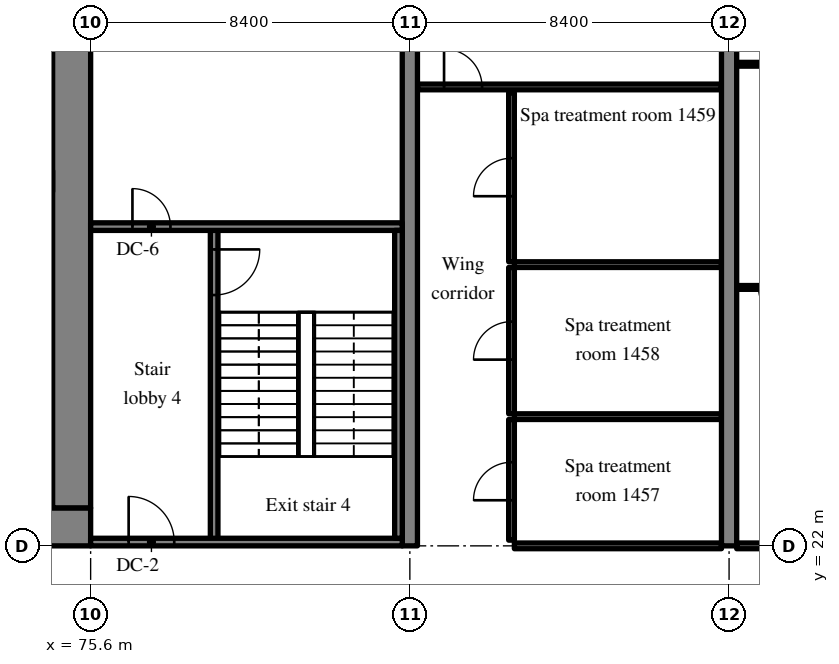
"""IFC4 building model, lengths in metres.
Left out: names, types, materials, properties, quantities, classifications, styles, units other than length and angle.
Written with IfcOpenShell. Run it as: python <this file> out.ifc"""

import sys

from ifc_helpers import new_model, si_unit, direction, frame, frame_2d, origin, place, context, subcontext, project, spatial, rectangle, extrude, source, transform, mapped, element, fill, save


model = new_model("IFC4")
c1 = context("Model", 3, precision=1e-05, world=origin(), true_north=direction((0.0, 1.0)))
c2 = subcontext(c1, "Body", "Model", "MODEL_VIEW")
j1 = project(units=[si_unit("LENGTHUNIT", "METRE"), si_unit("PLANEANGLEUNIT", "RADIAN")], contexts=[c1])
p1 = place(None, origin())
s1 = spatial("IfcSite", under=j1, at=p1, CompositionType="ELEMENT")
p2 = place(p1, origin())
s2 = spatial("IfcBuilding", under=s1, at=p2, CompositionType="ELEMENT")
p3 = place(p2, frame((0.0, 0.0, 62.0)))
s3 = spatial("IfcBuildingStorey", under=s2, at=p3, CompositionType="ELEMENT", Elevation=62.0)
m1 = source(origin(), c2, "Body", "SweptSolid", [
    extrude(rectangle(XDim=50.4, YDim=1.0, at=frame_2d((25.2, 0.0))), origin(), (0.0, 0.0, 1.0), 3.52),
])
p4 = place(p3, frame((25.2, 22.5, 0.0), z_axis=(0.0, 0.0, 1.0), x_axis=(1.0, 0.0, 0.0)))
e1 = element("IfcWall", 1, at=p4, inside=s3, PredefinedType="SHEAR", context=c2, shape_type="MappedRepresentation", body=[
    mapped(m1, transform((0.0, 0.0, 0.0), scale=1.0)),
])
m2 = source(origin(), c2, "Body", "SweptSolid", [
    extrude(rectangle(XDim=1.8, YDim=2.1, at=frame_2d((0.9, 1.05))), frame((0.0, 0.51, 0.0), z_axis=(0.0, -1.0, 0.0), x_axis=(1.0, 0.0, 0.0)), (0.0, 0.0, 1.0), 1.02),
])
p5 = place(p4, frame((15.9, 0.0, 0.0)))
e2 = element("IfcOpeningElement", 2, at=p5, cuts=e1, PredefinedType="OPENING", context=c2, shape_type="MappedRepresentation", body=[
    mapped(m2, transform((0.0, 0.0, 0.0), scale=1.0)),
])
m3 = source(origin(), c2, "Body", "SweptSolid", [
    extrude(rectangle(XDim=1.2, YDim=2.1, at=frame_2d((0.6, 1.05))), frame((0.0, 0.51, 0.0), z_axis=(0.0, -1.0, 0.0), x_axis=(1.0, 0.0, 0.0)), (0.0, 0.0, 1.0), 1.02),
])
p6 = place(p4, frame((26.987, 0.0, 0.0)))
e3 = element("IfcOpeningElement", 3, at=p6, cuts=e1, PredefinedType="OPENING", context=c2, shape_type="MappedRepresentation", body=[
    mapped(m3, transform((0.0, 0.0, 0.0), scale=1.0)),
])
m4 = source(origin(), c2, "Body", "SweptSolid", [
    extrude(rectangle(XDim=0.9, YDim=2.1, at=frame_2d((0.45, 1.05))), frame((0.0, 0.51, 0.0), z_axis=(0.0, -1.0, 0.0), x_axis=(1.0, 0.0, 0.0)), (0.0, 0.0, 1.0), 1.02),
])
p7 = place(p4, frame((34.5, 0.0, 0.0)))
e4 = element("IfcOpeningElement", 4, at=p7, cuts=e1, PredefinedType="OPENING", context=c2, shape_type="MappedRepresentation", body=[
    mapped(m4, transform((0.0, 0.0, 0.0), scale=1.0)),
])
p8 = place(p4, frame((31.5, 0.0, 0.0)))
e5 = element("IfcOpeningElement", 5, at=p8, cuts=e1, PredefinedType="OPENING", context=c2, shape_type="MappedRepresentation", body=[
    mapped(m4, transform((0.0, 0.0, 0.0), scale=1.0)),
])
p9 = place(p4, frame((39.769, 0.0, 0.0)))
e6 = element("IfcOpeningElement", 6, at=p9, cuts=e1, PredefinedType="OPENING", context=c2, shape_type="MappedRepresentation", body=[
    mapped(m4, transform((0.0, 0.0, 0.0), scale=1.0)),
])
p10 = place(p4, frame((36.756, 0.0, 0.0)))
e7 = element("IfcOpeningElement", 7, at=p10, cuts=e1, PredefinedType="OPENING", context=c2, shape_type="MappedRepresentation", body=[
    mapped(m4, transform((0.0, 0.0, 0.0), scale=1.0)),
])
p11 = place(p4, frame((6.438, 0.0, 0.0)))
e8 = element("IfcOpeningElement", 8, at=p11, cuts=e1, PredefinedType="OPENING", context=c2, shape_type="MappedRepresentation", body=[
    mapped(m3, transform((0.0, 0.0, 0.0), scale=1.0)),
])
p12 = place(p4, frame((47.725, 0.0, 0.0)))
e9 = element("IfcOpeningElement", 9, at=p12, cuts=e1, PredefinedType="OPENING", context=c2, shape_type="MappedRepresentation", body=[
    mapped(m3, transform((0.0, 0.0, 0.0), scale=1.0)),
])
m5 = source(origin(), c2, "Body", "SweptSolid", [
    extrude(rectangle(XDim=18.0, YDim=1.0, at=frame_2d((9.0, 0.0))), origin(), (0.0, 0.0, 1.0), 3.52),
])
p13 = place(p3, frame((75.1, 23.0, 0.0), z_axis=(0.0, 0.0, 1.0), x_axis=(0.0, 1.0, 0.0)))
e10 = element("IfcWall", 10, at=p13, inside=s3, PredefinedType="SHEAR", context=c2, shape_type="MappedRepresentation", body=[
    mapped(m5, transform((0.0, 0.0, 0.0), scale=1.0)),
])
p14 = place(p13, frame((12.4, 0.0, 0.0)))
e11 = element("IfcOpeningElement", 11, at=p14, cuts=e10, PredefinedType="OPENING", context=c2, shape_type="MappedRepresentation", body=[
    mapped(m3, transform((0.0, 0.0, 0.0), scale=1.0)),
])
m6 = source(origin(), c2, "Body", "SweptSolid", [
    extrude(rectangle(XDim=20.0, YDim=0.4, at=frame_2d((10.0, 0.0))), origin(), (0.0, 0.0, 1.0), 3.52),
])
for number, where, z_axis, x_axis in (
    (12, (84.0, 22.0, 0.0), (0.0, 0.0, 1.0), (0.0, 1.0, 0.0)),
    (13, (92.4, 22.0, 0.0), (0.0, 0.0, 1.0), (0.0, 1.0, 0.0)),
):
    element("IfcWall", number, at=place(p3, frame(where, z_axis=z_axis, x_axis=x_axis)), inside=s3, PredefinedType="SHEAR", context=c2, shape_type="MappedRepresentation", body=[
        mapped(m6, transform((0.0, 0.0, 0.0), scale=1.0)),
    ])
m7 = source(origin(), c2, "Body", "SweptSolid", [
    extrude(rectangle(XDim=2.15, YDim=0.2, at=frame_2d((1.075, 0.0))), origin(), (0.0, 0.0, 1.0), 3.52),
])
p15 = place(p3, frame((72.45, 33.6, 0.0), z_axis=(0.0, 0.0, 1.0), x_axis=(1.0, 0.0, 0.0)))
e14 = element("IfcWall", 14, at=p15, inside=s3, PredefinedType="SOLIDWALL", context=c2, shape_type="MappedRepresentation", body=[
    mapped(m7, transform((0.0, 0.0, 0.0), scale=1.0)),
])
m8 = source(origin(), c2, "Body", "SweptSolid", [
    extrude(rectangle(XDim=8.3, YDim=0.2, at=frame_2d((4.15, 0.0))), origin(), (0.0, 0.0, 1.0), 3.52),
])
p16 = place(p3, frame((78.85, 22.1, 0.0), z_axis=(0.0, 0.0, 1.0), x_axis=(0.0, 1.0, 0.0)))
e15 = element("IfcWall", 15, at=p16, inside=s3, PredefinedType="SOLIDWALL", context=c2, shape_type="MappedRepresentation", body=[
    mapped(m8, transform((0.0, 0.0, 0.0), scale=1.0)),
])
m9 = source(origin(), c2, "Body", "SweptSolid", [
    extrude(rectangle(XDim=1.2, YDim=2.1, at=frame_2d((0.6, 1.05))), frame((0.0, 0.11, 0.0), z_axis=(0.0, -1.0, 0.0), x_axis=(1.0, 0.0, 0.0)), (0.0, 0.0, 1.0), 0.22),
])
p17 = place(p16, frame((6.5, 0.0, 0.0)))
e16 = element("IfcOpeningElement", 16, at=p17, cuts=e15, PredefinedType="OPENING", context=c2, shape_type="MappedRepresentation", body=[
    mapped(m9, transform((0.0, 0.0, 0.0), scale=1.0)),
])
m10 = source(origin(), c2, "Body", "SweptSolid", [
    extrude(rectangle(XDim=8.2, YDim=0.2, at=frame_2d((4.1, 0.0))), origin(), (0.0, 0.0, 1.0), 3.52),
])
p18 = place(p3, frame((83.8, 22.1, 0.0), z_axis=(0.0, 0.0, 1.0), x_axis=(-1.0, 0.0, 0.0)))
e17 = element("IfcWall", 17, at=p18, inside=s3, PredefinedType="SOLIDWALL", context=c2, shape_type="MappedRepresentation", body=[
    mapped(m10, transform((0.0, 0.0, 0.0), scale=1.0)),
])
p19 = place(p18, frame((6.0, 0.0, 0.0)))
e18 = element("IfcOpeningElement", 18, at=p19, cuts=e17, PredefinedType="OPENING", context=c2, shape_type="MappedRepresentation", body=[
    mapped(m9, transform((0.0, 0.0, 0.0), scale=1.0)),
])
p20 = place(p3, frame((83.8, 30.4, 0.0), z_axis=(0.0, 0.0, 1.0), x_axis=(-1.0, 0.0, 0.0)))
e19 = element("IfcWall", 19, at=p20, inside=s3, PredefinedType="SOLIDWALL", context=c2, shape_type="MappedRepresentation", body=[
    mapped(m10, transform((0.0, 0.0, 0.0), scale=1.0)),
])
m11 = source(origin(), c2, "Body", "SweptSolid", [
    extrude(rectangle(XDim=1.0, YDim=2.1, at=frame_2d((0.5, 1.05))), frame((0.0, 0.11, 0.0), z_axis=(0.0, -1.0, 0.0), x_axis=(1.0, 0.0, 0.0)), (0.0, 0.0, 1.0), 0.22),
])
p21 = place(p20, frame((6.1, 0.0, 0.0)))
e20 = element("IfcOpeningElement", 20, at=p21, cuts=e19, PredefinedType="OPENING", context=c2, shape_type="MappedRepresentation", body=[
    mapped(m11, transform((0.0, 0.0, 0.0), scale=1.0)),
])
m12 = source(origin(), c2, "Body", "SweptSolid", [
    extrude(rectangle(XDim=8.1, YDim=0.2, at=frame_2d((4.05, 0.0))), origin(), (0.0, 0.0, 1.0), 3.52),
])
p22 = place(p3, frame((83.7, 22.2, 0.0), z_axis=(0.0, 0.0, 1.0), x_axis=(0.0, 1.0, 0.0)))
e21 = element("IfcWall", 21, at=p22, inside=s3, PredefinedType="SOLIDWALL", context=c2, shape_type="MappedRepresentation", body=[
    mapped(m12, transform((0.0, 0.0, 0.0), scale=1.0)),
])
m13 = source(origin(), c2, "Body", "SweptSolid", [
    extrude(rectangle(XDim=5.45, YDim=0.15, at=frame_2d((2.725, 0.0))), origin(), (0.0, 0.0, 1.0), 2.82),
])
p23 = place(p3, frame((86.75, 22.0, 0.0), z_axis=(0.0, 0.0, 1.0), x_axis=(1.0, 0.0, 0.0)))
e22 = element("IfcWall", 22, at=p23, inside=s3, PredefinedType="PARTITIONING", context=c2, shape_type="MappedRepresentation", body=[
    mapped(m13, transform((0.0, 0.0, 0.0), scale=1.0)),
])
m14 = source(origin(), c2, "Body", "SweptSolid", [
    extrude(rectangle(XDim=3.175, YDim=0.15, at=frame_2d((1.587, 0.0))), origin(), (0.0, 0.0, 1.0), 3.52),
])
p24 = place(p3, frame((86.675, 22.15, 0.0), z_axis=(0.0, 0.0, 1.0), x_axis=(0.0, 1.0, 0.0)))
e23 = element("IfcWall", 23, at=p24, inside=s3, PredefinedType="PARTITIONING", context=c2, shape_type="MappedRepresentation", body=[
    mapped(m14, transform((0.0, 0.0, 0.0), scale=1.0)),
])
m15 = source(origin(), c2, "Body", "SweptSolid", [
    extrude(rectangle(XDim=1.0, YDim=2.1, at=frame_2d((0.5, 1.05))), frame((0.0, 0.085, 0.0), z_axis=(0.0, -1.0, 0.0), x_axis=(1.0, 0.0, 0.0)), (0.0, 0.0, 1.0), 0.17),
])
p25 = place(p24, frame((1.05, 0.0, 0.0)))
e24 = element("IfcOpeningElement", 24, at=p25, cuts=e23, PredefinedType="OPENING", context=c2, shape_type="MappedRepresentation", body=[
    mapped(m15, transform((0.0, 0.0, 0.0), scale=1.0)),
])
m16 = source(origin(), c2, "Body", "SweptSolid", [
    extrude(rectangle(XDim=5.45, YDim=0.15, at=frame_2d((2.725, 0.0))), origin(), (0.0, 0.0, 1.0), 3.52),
])
p26 = place(p3, frame((86.75, 25.4, 0.0), z_axis=(0.0, 0.0, 1.0), x_axis=(1.0, 0.0, 0.0)))
e25 = element("IfcWall", 25, at=p26, inside=s3, PredefinedType="PARTITIONING", context=c2, shape_type="MappedRepresentation", body=[
    mapped(m16, transform((0.0, 0.0, 0.0), scale=1.0)),
])
m17 = source(origin(), c2, "Body", "SweptSolid", [
    extrude(rectangle(XDim=3.85, YDim=0.15, at=frame_2d((1.925, 0.0))), origin(), (0.0, 0.0, 1.0), 3.52),
])
p27 = place(p3, frame((86.675, 25.475, 0.0), z_axis=(0.0, 0.0, 1.0), x_axis=(0.0, 1.0, 0.0)))
e26 = element("IfcWall", 26, at=p27, inside=s3, PredefinedType="PARTITIONING", context=c2, shape_type="MappedRepresentation", body=[
    mapped(m17, transform((0.0, 0.0, 0.0), scale=1.0)),
])
p28 = place(p27, frame((1.425, 0.0, 0.0)))
e27 = element("IfcOpeningElement", 27, at=p28, cuts=e26, PredefinedType="OPENING", context=c2, shape_type="MappedRepresentation", body=[
    mapped(m15, transform((0.0, 0.0, 0.0), scale=1.0)),
])
p29 = place(p3, frame((86.75, 29.4, 0.0), z_axis=(0.0, 0.0, 1.0), x_axis=(1.0, 0.0, 0.0)))
e28 = element("IfcWall", 28, at=p29, inside=s3, PredefinedType="PARTITIONING", context=c2, shape_type="MappedRepresentation", body=[
    mapped(m16, transform((0.0, 0.0, 0.0), scale=1.0)),
])
m18 = source(origin(), c2, "Body", "SweptSolid", [
    extrude(rectangle(XDim=4.45, YDim=0.15, at=frame_2d((2.225, 0.0))), origin(), (0.0, 0.0, 1.0), 3.52),
])
p30 = place(p3, frame((86.675, 29.475, 0.0), z_axis=(0.0, 0.0, 1.0), x_axis=(0.0, 1.0, 0.0)))
e29 = element("IfcWall", 29, at=p30, inside=s3, PredefinedType="PARTITIONING", context=c2, shape_type="MappedRepresentation", body=[
    mapped(m18, transform((0.0, 0.0, 0.0), scale=1.0)),
])
p31 = place(p30, frame((1.725, 0.0, 0.0)))
e30 = element("IfcOpeningElement", 30, at=p31, cuts=e29, PredefinedType="OPENING", context=c2, shape_type="MappedRepresentation", body=[
    mapped(m15, transform((0.0, 0.0, 0.0), scale=1.0)),
])
m19 = source(origin(), c2, "Body", "SweptSolid", [
    extrude(rectangle(XDim=8.0, YDim=0.15, at=frame_2d((4.0, 0.0))), origin(), (0.0, 0.0, 1.0), 3.52),
])
p32 = place(p3, frame((84.2, 34.075, 0.0), z_axis=(0.0, 0.0, 1.0), x_axis=(1.0, 0.0, 0.0)))
e31 = element("IfcWall", 31, at=p32, inside=s3, PredefinedType="PARTITIONING", context=c2, shape_type="MappedRepresentation", body=[
    mapped(m19, transform((0.0, 0.0, 0.0), scale=1.0)),
])
p33 = place(p32, frame((0.7, 0.0, 0.0)))
e32 = element("IfcOpeningElement", 32, at=p33, cuts=e31, PredefinedType="OPENING", context=c2, shape_type="MappedRepresentation", body=[
    mapped(m15, transform((0.0, 0.0, 0.0), scale=1.0)),
])
m20 = source(origin(), c2, "Body", "SweptSolid", [
    extrude(rectangle(XDim=2.05, YDim=0.1, at=frame_2d((1.025, 0.0))), origin(), (0.0, 0.0, 1.0), 3.52),
])
p34 = place(p3, frame((92.6, 28.8, 0.0), z_axis=(0.0, 0.0, 1.0), x_axis=(1.0, 0.0, 0.0)))
e33 = element("IfcWall", 33, at=p34, inside=s3, PredefinedType="PARTITIONING", context=c2, shape_type="MappedRepresentation", body=[
    mapped(m20, transform((0.0, 0.0, 0.0), scale=1.0)),
])
m21 = source(origin(), c2, "Body", "SweptSolid", [
    extrude(rectangle(XDim=0.9, YDim=2.1, at=frame_2d((0.45, 1.05))), frame((0.0, 0.06, 0.0), z_axis=(0.0, -1.0, 0.0), x_axis=(1.0, 0.0, 0.0)), (0.0, 0.0, 1.0), 0.12),
])
p35 = place(p34, frame((0.575, 0.0, 0.0)))
e34 = element("IfcOpeningElement", 34, at=p35, cuts=e33, PredefinedType="OPENING", context=c2, shape_type="MappedRepresentation", body=[
    mapped(m21, transform((0.0, 0.0, 0.0), scale=1.0)),
])
m22 = source(origin(), c2, "Body", "SweptSolid", [
    extrude(rectangle(XDim=7.8, YDim=0.1, at=frame_2d((3.9, 0.0))), origin(), (0.0, 0.0, 1.0), 3.52),
])
p36 = place(p3, frame((92.6, 34.672, 0.0), z_axis=(0.0, 0.0, 1.0), x_axis=(1.0, 0.0, 0.0)))
e35 = element("IfcWall", 35, at=p36, inside=s3, PredefinedType="PARTITIONING", context=c2, shape_type="MappedRepresentation", body=[
    mapped(m22, transform((0.0, 0.0, 0.0), scale=1.0)),
])
m23 = source(origin(), c2, "Body", "SweptSolid", [
    extrude(rectangle(XDim=1.8, YDim=2.1, at=frame_2d((0.9, 1.05))), frame((0.0, 0.06, 0.0), z_axis=(0.0, -1.0, 0.0), x_axis=(1.0, 0.0, 0.0)), (0.0, 0.0, 1.0), 0.12),
])
p37 = place(p36, frame((3.0, 0.0, 0.0)))
e36 = element("IfcOpeningElement", 36, at=p37, cuts=e35, PredefinedType="OPENING", context=c2, shape_type="MappedRepresentation", body=[
    mapped(m23, transform((0.0, 0.0, 0.0), scale=1.0)),
])
m24 = source(origin(), c2, "Body", "SweptSolid", [
    extrude(rectangle(XDim=7.8, YDim=0.15, at=frame_2d((3.9, 0.0))), origin(), (0.0, 0.0, 1.0), 2.82),
])
p38 = place(p3, frame((92.6, 22.0, 0.0), z_axis=(0.0, 0.0, 1.0), x_axis=(1.0, 0.0, 0.0)))
e37 = element("IfcWall", 37, at=p38, inside=s3, PredefinedType="PARTITIONING", context=c2, shape_type="MappedRepresentation", body=[
    mapped(m24, transform((0.0, 0.0, 0.0), scale=1.0)),
])
p39 = place(p38, frame((6.25, 0.0, 0.0)))
e38 = element("IfcOpeningElement", 38, at=p39, cuts=e37, PredefinedType="OPENING", context=c2, shape_type="MappedRepresentation", body=[
    mapped(m15, transform((0.0, 0.0, 0.0), scale=1.0)),
])
m25 = source(origin(), c2, "Body", "SweptSolid", [
    extrude(rectangle(XDim=1.2, YDim=2.1, at=frame_2d((0.6, 1.05))), frame((0.0, 0.025, 0.0), z_axis=(0.0, -1.0, 0.0), x_axis=(1.0, 0.0, 0.0)), (0.0, 0.0, 1.0), 0.05),
])
p40 = place(p17, origin())
e39 = element("IfcDoor", 39, at=p40, inside=s3, OperationType="SINGLE_SWING_RIGHT", PredefinedType="DOOR", context=c2, shape_type="MappedRepresentation", body=[
    mapped(m25, transform((0.0, 0.0, 0.0), scale=1.0)),
])
fill(e16, e39)
p41 = place(p19, origin())
e40 = element("IfcDoor", 40, at=p41, inside=s3, OperationType="SINGLE_SWING_RIGHT", PredefinedType="DOOR", context=c2, shape_type="MappedRepresentation", body=[
    mapped(m25, transform((0.0, 0.0, 0.0), scale=1.0)),
])
fill(e18, e40)
m26 = source(origin(), c2, "Body", "SweptSolid", [
    extrude(rectangle(XDim=1.0, YDim=2.1, at=frame_2d((0.5, 1.05))), frame((0.0, 0.025, 0.0), z_axis=(0.0, -1.0, 0.0), x_axis=(1.0, 0.0, 0.0)), (0.0, 0.0, 1.0), 0.05),
])
p42 = place(p21, origin())
e41 = element("IfcDoor", 41, at=p42, inside=s3, OperationType="SINGLE_SWING_RIGHT", PredefinedType="DOOR", context=c2, shape_type="MappedRepresentation", body=[
    mapped(m26, transform((0.0, 0.0, 0.0), scale=1.0)),
])
fill(e20, e41)
p43 = place(p25, origin())
e42 = element("IfcDoor", 42, at=p43, inside=s3, OperationType="SINGLE_SWING_LEFT", PredefinedType="DOOR", context=c2, shape_type="MappedRepresentation", body=[
    mapped(m26, transform((0.0, 0.0, 0.0), scale=1.0)),
])
fill(e24, e42)
p44 = place(p28, origin())
e43 = element("IfcDoor", 43, at=p44, inside=s3, OperationType="SINGLE_SWING_LEFT", PredefinedType="DOOR", context=c2, shape_type="MappedRepresentation", body=[
    mapped(m26, transform((0.0, 0.0, 0.0), scale=1.0)),
])
fill(e27, e43)
p45 = place(p31, origin())
e44 = element("IfcDoor", 44, at=p45, inside=s3, OperationType="SINGLE_SWING_LEFT", PredefinedType="DOOR", context=c2, shape_type="MappedRepresentation", body=[
    mapped(m26, transform((0.0, 0.0, 0.0), scale=1.0)),
])
fill(e30, e44)
p46 = place(p33, origin())
e45 = element("IfcDoor", 45, at=p46, inside=s3, OperationType="SINGLE_SWING_LEFT", PredefinedType="DOOR", context=c2, shape_type="MappedRepresentation", body=[
    mapped(m26, transform((0.0, 0.0, 0.0), scale=1.0)),
])
fill(e32, e45)
m27 = source(origin(), c2, "Body", "SweptSolid", [
    extrude(rectangle(XDim=0.9, YDim=2.1, at=frame_2d((0.45, 1.05))), frame((0.0, 0.025, 0.0), z_axis=(0.0, -1.0, 0.0), x_axis=(1.0, 0.0, 0.0)), (0.0, 0.0, 1.0), 0.05),
])
p47 = place(p35, origin())
e46 = element("IfcDoor", 46, at=p47, inside=s3, OperationType="SINGLE_SWING_RIGHT", PredefinedType="DOOR", context=c2, shape_type="MappedRepresentation", body=[
    mapped(m27, transform((0.0, 0.0, 0.0), scale=1.0)),
])
fill(e34, e46)
save(model, sys.argv[1])
